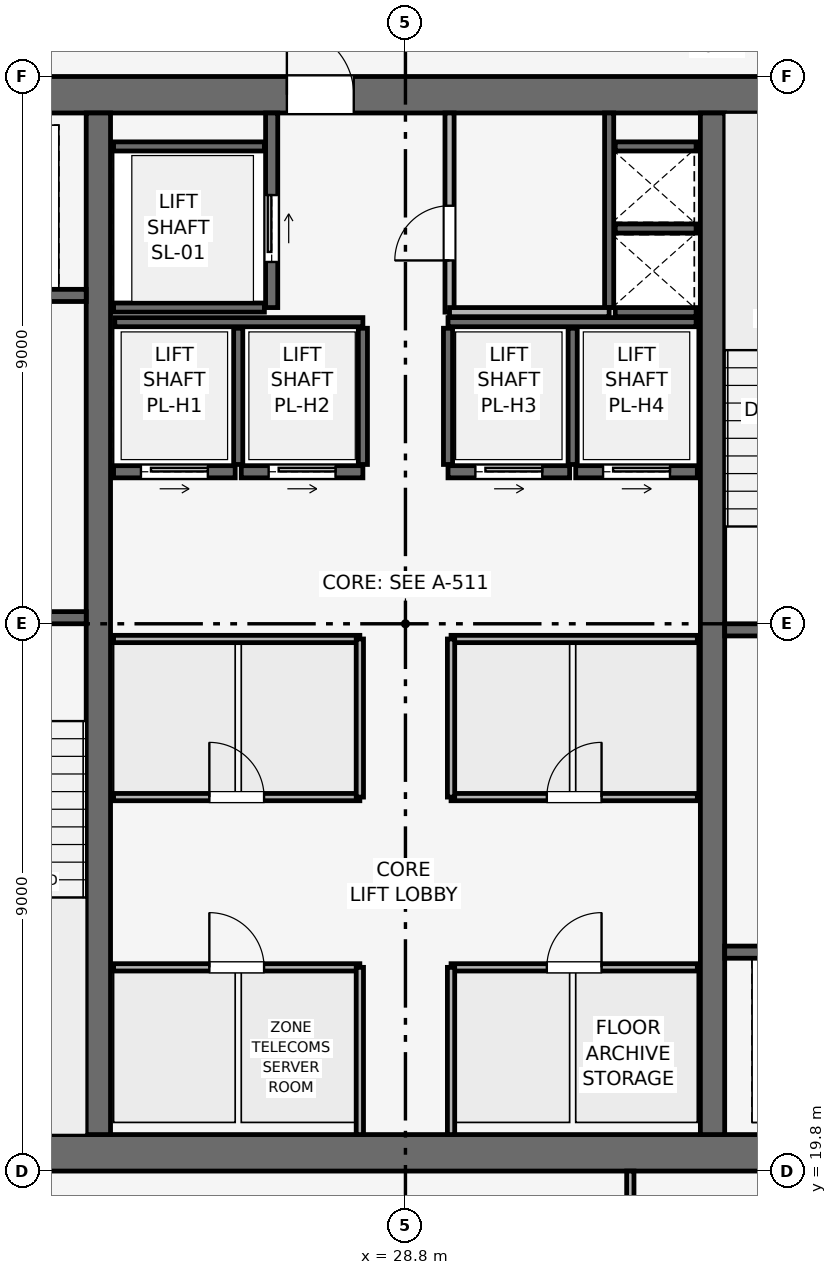
"""IFC4 building model, lengths in metres.
Left out: names, types, materials, properties, quantities, classifications, styles, units other than length and angle.
Written with IfcOpenShell. Run it as: python <this file> out.ifc"""

import sys

from ifc_helpers import new_model, si_unit, direction, frame, frame_2d, origin, place, context, subcontext, project, spatial, rectangle, extrude, element, fill, save


model = new_model("IFC4")
c1 = context("Model", 3, precision=1e-05, world=origin(), true_north=direction((0.0, 1.0)))
c2 = subcontext(c1, "Body", "Model", "MODEL_VIEW")
j1 = project(units=[si_unit("LENGTHUNIT", "METRE"), si_unit("PLANEANGLEUNIT", "RADIAN")], contexts=[c1])
p1 = place(None, origin())
s1 = spatial("IfcSite", under=j1, at=p1, CompositionType="ELEMENT")
p2 = place(p1, origin())
s2 = spatial("IfcBuilding", under=s1, at=p2, CompositionType="ELEMENT")
p3 = place(p2, frame((0.0, 0.0, 310.5)))
s3 = spatial("IfcBuildingStorey", under=s2, at=p3, CompositionType="ELEMENT", Elevation=310.5)
p4 = place(p3, frame((19.8, 20.1, 0.0), z_axis=(0.0, 0.0, 1.0), x_axis=(1.0, 0.0, 0.0)))
e1 = element("IfcWall", 1, at=p4, inside=s3, PredefinedType="SHEAR", context=c2, shape_type="SweptSolid", body=[
    extrude(rectangle(XDim=18.0, YDim=0.6, at=frame_2d((9.0, 0.0))), origin(), (0.0, 0.0, 1.0), 3.75),
])
p5 = place(p3, frame((19.8, 37.5, 0.0), z_axis=(0.0, 0.0, 1.0), x_axis=(1.0, 0.0, 0.0)))
e2 = element("IfcWall", 2, at=p5, inside=s3, PredefinedType="SHEAR", context=c2, shape_type="SweptSolid", body=[
    extrude(rectangle(XDim=18.0, YDim=0.6, at=frame_2d((9.0, 0.0))), origin(), (0.0, 0.0, 1.0), 3.75),
])
p6 = place(p5, frame((7.05, 0.0, 0.0)))
e3 = element("IfcOpeningElement", 3, at=p6, cuts=e2, PredefinedType="OPENING", context=c2, shape_type="SweptSolid", body=[
    extrude(rectangle(XDim=1.1, YDim=2.15, at=frame_2d((0.55, 1.075))), frame((0.0, 0.31, 0.0), z_axis=(0.0, -1.0, 0.0), x_axis=(1.0, 0.0, 0.0)), (0.0, 0.0, 1.0), 0.62),
])
for number, where, z_axis, x_axis in (
    (4, (23.75, 20.4, 0.0), (0.0, 0.0, 1.0), (0.0, 1.0, 0.0)),
    (5, (33.85, 20.4, 0.0), (0.0, 0.0, 1.0), (0.0, 1.0, 0.0)),
):
    element("IfcWall", number, at=place(p3, frame(where, z_axis=z_axis, x_axis=x_axis)), inside=s3, PredefinedType="SHEAR", context=c2, shape_type="SweptSolid", body=[
        extrude(rectangle(XDim=16.8, YDim=0.4, at=frame_2d((8.4, 0.0))), origin(), (0.0, 0.0, 1.0), 3.75),
    ])
p7 = place(p3, frame((20.4, 28.9, 0.0), z_axis=(0.0, 0.0, 1.0), x_axis=(1.0, 0.0, 0.0)))
e6 = element("IfcWall", 6, at=p7, inside=s3, PredefinedType="SHEAR", context=c2, shape_type="SweptSolid", body=[
    extrude(rectangle(XDim=3.15, YDim=0.2, at=frame_2d((1.575, 0.0))), origin(), (0.0, 0.0, 1.0), 3.51),
])
p8 = place(p7, frame((0.8, 0.0, 0.0)))
e7 = element("IfcOpeningElement", 7, at=p8, cuts=e6, PredefinedType="OPENING", context=c2, shape_type="SweptSolid", body=[
    extrude(rectangle(XDim=1.0, YDim=2.1, at=frame_2d((0.5, 1.05))), frame((0.0, 0.11, 0.0), z_axis=(0.0, -1.0, 0.0), x_axis=(1.0, 0.0, 0.0)), (0.0, 0.0, 1.0), 0.22),
])
p9 = place(p3, frame((34.05, 28.7, 0.0), z_axis=(0.0, 0.0, 1.0), x_axis=(1.0, 0.0, 0.0)))
e8 = element("IfcWall", 8, at=p9, inside=s3, PredefinedType="SHEAR", context=c2, shape_type="SweptSolid", body=[
    extrude(rectangle(XDim=3.15, YDim=0.2, at=frame_2d((1.575, 0.0))), origin(), (0.0, 0.0, 1.0), 3.51),
])
p10 = place(p9, frame((0.8, 0.0, 0.0)))
e9 = element("IfcOpeningElement", 9, at=p10, cuts=e8, PredefinedType="OPENING", context=c2, shape_type="SweptSolid", body=[
    extrude(rectangle(XDim=1.0, YDim=2.1, at=frame_2d((0.5, 1.05))), frame((0.0, 0.11, 0.0), z_axis=(0.0, -1.0, 0.0), x_axis=(1.0, 0.0, 0.0)), (0.0, 0.0, 1.0), 0.22),
])
p11 = place(p3, frame((32.15, 34.0, 0.0), z_axis=(0.0, 0.0, 1.0), x_axis=(0.0, 1.0, 0.0)))
e10 = element("IfcWall", 10, at=p11, inside=s3, PredefinedType="SHEAR", context=c2, shape_type="SweptSolid", body=[
    extrude(rectangle(XDim=3.2, YDim=0.15, at=frame_2d((1.6, 0.0))), origin(), (0.0, 0.0, 1.0), 3.51),
])
for number, where, z_axis, x_axis in (
    (11, (32.25, 33.925, 0.0), (0.0, 0.0, 1.0), (1.0, 0.0, 0.0)),
    (12, (32.25, 35.3, 0.0), (0.0, 0.0, 1.0), (1.0, 0.0, 0.0)),
):
    element("IfcWall", number, at=place(p3, frame(where, z_axis=z_axis, x_axis=x_axis)), inside=s3, PredefinedType="SHEAR", context=c2, shape_type="SweptSolid", body=[
        extrude(rectangle(XDim=1.33, YDim=0.15, at=frame_2d((0.665, 0.0))), origin(), (0.0, 0.0, 1.0), 3.51),
    ])
p12 = place(p3, frame((20.5, 34.2, 0.0), z_axis=(0.0, 0.0, 1.0), x_axis=(1.0, 0.0, 0.0)))
e13 = element("IfcWall", 13, at=p12, inside=s3, PredefinedType="SHEAR", context=c2, shape_type="SweptSolid", body=[
    extrude(rectangle(XDim=3.05, YDim=0.2, at=frame_2d((1.525, 0.0))), origin(), (0.0, 0.0, 1.0), 3.51),
])
p13 = place(p12, frame((0.75, 0.0, 0.0)))
e14 = element("IfcOpeningElement", 14, at=p13, cuts=e13, PredefinedType="OPENING", context=c2, shape_type="SweptSolid", body=[
    extrude(rectangle(XDim=1.1, YDim=2.15, at=frame_2d((0.55, 1.075))), frame((0.0, 0.11, 0.0), z_axis=(0.0, -1.0, 0.0), x_axis=(1.0, 0.0, 0.0)), (0.0, 0.0, 1.0), 0.22),
])
p14 = place(p3, frame((34.05, 23.4, 0.0), z_axis=(0.0, 0.0, 1.0), x_axis=(1.0, 0.0, 0.0)))
e15 = element("IfcWall", 15, at=p14, inside=s3, PredefinedType="SHEAR", context=c2, shape_type="SweptSolid", body=[
    extrude(rectangle(XDim=3.05, YDim=0.2, at=frame_2d((1.525, 0.0))), origin(), (0.0, 0.0, 1.0), 3.51),
])
p15 = place(p14, frame((1.2, 0.0, 0.0)))
e16 = element("IfcOpeningElement", 16, at=p15, cuts=e15, PredefinedType="OPENING", context=c2, shape_type="SweptSolid", body=[
    extrude(rectangle(XDim=1.1, YDim=2.15, at=frame_2d((0.55, 1.075))), frame((0.0, 0.11, 0.0), z_axis=(0.0, -1.0, 0.0), x_axis=(1.0, 0.0, 0.0)), (0.0, 0.0, 1.0), 0.22),
])
p16 = place(p3, frame((26.6, 34.0, 0.0), z_axis=(0.0, 0.0, 1.0), x_axis=(0.0, 1.0, 0.0)))
e17 = element("IfcWall", 17, at=p16, inside=s3, PredefinedType="SHEAR", context=c2, shape_type="SweptSolid", body=[
    extrude(rectangle(XDim=3.2, YDim=0.2, at=frame_2d((1.6, 0.0))), origin(), (0.0, 0.0, 1.0), 3.51),
])
p17 = place(p16, frame((0.75, 0.0, 0.0)))
e18 = element("IfcOpeningElement", 18, at=p17, cuts=e17, PredefinedType="OPENING", context=c2, shape_type="SweptSolid", body=[
    extrude(rectangle(XDim=1.1, YDim=2.15, at=frame_2d((0.55, 1.075))), frame((0.0, 0.11, 0.0), z_axis=(0.0, -1.0, 0.0), x_axis=(1.0, 0.0, 0.0)), (0.0, 0.0, 1.0), 0.22),
])
for number, where, z_axis, x_axis in (
    (19, (24.0, 34.0, 0.0), (0.0, 0.0, 1.0), (1.0, 0.0, 0.0)),
    (20, (24.0, 36.65, 0.0), (0.0, 0.0, 1.0), (1.0, 0.0, 0.0)),
):
    element("IfcWall", number, at=place(p3, frame(where, z_axis=z_axis, x_axis=x_axis)), inside=s3, PredefinedType="SHEAR", context=c2, shape_type="SweptSolid", body=[
        extrude(rectangle(XDim=2.48, YDim=0.15, at=frame_2d((1.24, 0.0))), origin(), (0.0, 0.0, 1.0), 3.51),
    ])
p18 = place(p3, frame((24.0, 31.3, 0.0), z_axis=(0.0, 0.0, 1.0), x_axis=(1.0, 0.0, 0.0)))
e21 = element("IfcWall", 21, at=p18, inside=s3, PredefinedType="SHEAR", context=c2, shape_type="SweptSolid", body=[
    extrude(rectangle(XDim=2.0, YDim=0.2, at=frame_2d((1.0, 0.0))), origin(), (0.0, 0.0, 1.0), 3.51),
])
p19 = place(p18, frame((0.45, 0.0, 0.0)))
e22 = element("IfcOpeningElement", 22, at=p19, cuts=e21, PredefinedType="OPENING", context=c2, shape_type="SweptSolid", body=[
    extrude(rectangle(XDim=1.1, YDim=2.15, at=frame_2d((0.55, 1.075))), frame((0.0, 0.11, 0.0), z_axis=(0.0, -1.0, 0.0), x_axis=(1.0, 0.0, 0.0)), (0.0, 0.0, 1.0), 0.22),
])
p20 = place(p3, frame((26.1, 31.3, 0.0), z_axis=(0.0, 0.0, 1.0), x_axis=(1.0, 0.0, 0.0)))
e23 = element("IfcWall", 23, at=p20, inside=s3, PredefinedType="SHEAR", context=c2, shape_type="SweptSolid", body=[
    extrude(rectangle(XDim=2.0, YDim=0.2, at=frame_2d((1.0, 0.0))), origin(), (0.0, 0.0, 1.0), 3.51),
])
p21 = place(p20, frame((0.45, 0.0, 0.0)))
e24 = element("IfcOpeningElement", 24, at=p21, cuts=e23, PredefinedType="OPENING", context=c2, shape_type="SweptSolid", body=[
    extrude(rectangle(XDim=1.1, YDim=2.15, at=frame_2d((0.55, 1.075))), frame((0.0, 0.11, 0.0), z_axis=(0.0, -1.0, 0.0), x_axis=(1.0, 0.0, 0.0)), (0.0, 0.0, 1.0), 0.22),
])
p22 = place(p3, frame((29.5, 31.3, 0.0), z_axis=(0.0, 0.0, 1.0), x_axis=(1.0, 0.0, 0.0)))
e25 = element("IfcWall", 25, at=p22, inside=s3, PredefinedType="SHEAR", context=c2, shape_type="SweptSolid", body=[
    extrude(rectangle(XDim=2.0, YDim=0.2, at=frame_2d((1.0, 0.0))), origin(), (0.0, 0.0, 1.0), 3.51),
])
p23 = place(p22, frame((0.45, 0.0, 0.0)))
e26 = element("IfcOpeningElement", 26, at=p23, cuts=e25, PredefinedType="OPENING", context=c2, shape_type="SweptSolid", body=[
    extrude(rectangle(XDim=1.1, YDim=2.15, at=frame_2d((0.55, 1.075))), frame((0.0, 0.11, 0.0), z_axis=(0.0, -1.0, 0.0), x_axis=(1.0, 0.0, 0.0)), (0.0, 0.0, 1.0), 0.22),
])
p24 = place(p3, frame((31.6, 31.3, 0.0), z_axis=(0.0, 0.0, 1.0), x_axis=(1.0, 0.0, 0.0)))
e27 = element("IfcWall", 27, at=p24, inside=s3, PredefinedType="SHEAR", context=c2, shape_type="SweptSolid", body=[
    extrude(rectangle(XDim=2.0, YDim=0.2, at=frame_2d((1.0, 0.0))), origin(), (0.0, 0.0, 1.0), 3.51),
])
p25 = place(p24, frame((0.45, 0.0, 0.0)))
e28 = element("IfcOpeningElement", 28, at=p25, cuts=e27, PredefinedType="OPENING", context=c2, shape_type="SweptSolid", body=[
    extrude(rectangle(XDim=1.1, YDim=2.15, at=frame_2d((0.55, 1.075))), frame((0.0, 0.11, 0.0), z_axis=(0.0, -1.0, 0.0), x_axis=(1.0, 0.0, 0.0)), (0.0, 0.0, 1.0), 0.22),
])
p26 = place(p3, frame((32.25, 36.65, 0.0), z_axis=(0.0, 0.0, 1.0), x_axis=(1.0, 0.0, 0.0)))
e29 = element("IfcWall", 29, at=p26, inside=s3, PredefinedType="SHEAR", context=c2, shape_type="SweptSolid", body=[
    extrude(rectangle(XDim=1.33, YDim=0.15, at=frame_2d((0.665, 0.0))), origin(), (0.0, 0.0, 1.0), 3.51),
])
for number, where, z_axis, x_axis in (
    (30, (24.02, 33.76, 0.0), (0.0, 0.0, 1.0), (1.0, 0.0, 0.0)),
    (31, (29.5, 33.76, 0.0), (0.0, 0.0, 1.0), (1.0, 0.0, 0.0)),
):
    element("IfcWall", number, at=place(p3, frame(where, z_axis=z_axis, x_axis=x_axis)), inside=s3, PredefinedType="SHEAR", context=c2, shape_type="SweptSolid", body=[
        extrude(rectangle(XDim=4.08, YDim=0.15, at=frame_2d((2.04, 0.0))), origin(), (0.0, 0.0, 1.0), 3.51),
    ])
for number, where, z_axis, x_axis in (
    (32, (26.05, 31.42, 0.0), (0.0, 0.0, 1.0), (0.0, 1.0, 0.0)),
    (33, (28.1, 31.42, 0.0), (0.0, 0.0, 1.0), (0.0, 1.0, 0.0)),
    (34, (29.5, 31.42, 0.0), (0.0, 0.0, 1.0), (0.0, 1.0, 0.0)),
    (35, (31.55, 31.42, 0.0), (0.0, 0.0, 1.0), (0.0, 1.0, 0.0)),
):
    element("IfcWall", number, at=place(p3, frame(where, z_axis=z_axis, x_axis=x_axis)), inside=s3, PredefinedType="SHEAR", context=c2, shape_type="SweptSolid", body=[
        extrude(rectangle(XDim=2.24, YDim=0.15, at=frame_2d((1.12, 0.0))), origin(), (0.0, 0.0, 1.0), 3.51),
    ])
p27 = place(p3, frame((29.525, 33.925, 0.0), z_axis=(0.0, 0.0, 1.0), x_axis=(0.0, 1.0, 0.0)))
e36 = element("IfcWall", 36, at=p27, inside=s3, PredefinedType="PARTITIONING", context=c2, shape_type="SweptSolid", body=[
    extrude(rectangle(XDim=3.275, YDim=0.15, at=frame_2d((1.637, 0.0))), origin(), (0.0, 0.0, 1.0), 3.51),
])
p28 = place(p27, frame((0.85, 0.0, 0.0)))
e37 = element("IfcOpeningElement", 37, at=p28, cuts=e36, PredefinedType="OPENING", context=c2, shape_type="SweptSolid", body=[
    extrude(rectangle(XDim=0.9, YDim=2.1, at=frame_2d((0.45, 1.05))), frame((0.0, 0.085, 0.0), z_axis=(0.0, -1.0, 0.0), x_axis=(1.0, 0.0, 0.0)), (0.0, 0.0, 1.0), 0.17),
])
p29 = place(p3, frame((29.525, 33.925, 0.0), z_axis=(0.0, 0.0, 1.0), x_axis=(1.0, 0.0, 0.0)))
e38 = element("IfcWall", 38, at=p29, inside=s3, PredefinedType="PARTITIONING", context=c2, shape_type="SweptSolid", body=[
    extrude(rectangle(XDim=2.625, YDim=0.15, at=frame_2d((1.312, 0.0))), origin(), (0.0, 0.0, 1.0), 3.51),
])
p30 = place(p3, frame((24.0, 23.15, 0.0), z_axis=(0.0, 0.0, 1.0), x_axis=(1.0, 0.0, 0.0)))
e39 = element("IfcWall", 39, at=p30, inside=s3, PredefinedType="PARTITIONING", context=c2, shape_type="SweptSolid", body=[
    extrude(rectangle(XDim=4.05, YDim=0.12, at=frame_2d((2.025, 0.0))), origin(), (0.0, 0.0, 1.0), 3.51),
])
p31 = place(p30, frame((1.575, 0.0, 0.0)))
e40 = element("IfcOpeningElement", 40, at=p31, cuts=e39, PredefinedType="OPENING", context=c2, shape_type="SweptSolid", body=[
    extrude(rectangle(XDim=0.9, YDim=2.1, at=frame_2d((0.45, 1.05))), frame((0.0, 0.07, 0.0), z_axis=(0.0, -1.0, 0.0), x_axis=(1.0, 0.0, 0.0)), (0.0, 0.0, 1.0), 0.14),
])
p32 = place(p3, frame((28.05, 20.4, 0.0), z_axis=(0.0, 0.0, 1.0), x_axis=(0.0, 1.0, 0.0)))
e41 = element("IfcWall", 41, at=p32, inside=s3, PredefinedType="PARTITIONING", context=c2, shape_type="SweptSolid", body=[
    extrude(rectangle(XDim=2.75, YDim=0.12, at=frame_2d((1.375, 0.0))), origin(), (0.0, 0.0, 1.0), 3.51),
])
p33 = place(p3, frame((29.55, 23.15, 0.0), z_axis=(0.0, 0.0, 1.0), x_axis=(1.0, 0.0, 0.0)))
e42 = element("IfcWall", 42, at=p33, inside=s3, PredefinedType="PARTITIONING", context=c2, shape_type="SweptSolid", body=[
    extrude(rectangle(XDim=4.05, YDim=0.12, at=frame_2d((2.025, 0.0))), origin(), (0.0, 0.0, 1.0), 3.51),
])
p34 = place(p33, frame((1.575, 0.0, 0.0)))
e43 = element("IfcOpeningElement", 43, at=p34, cuts=e42, PredefinedType="OPENING", context=c2, shape_type="SweptSolid", body=[
    extrude(rectangle(XDim=0.9, YDim=2.1, at=frame_2d((0.45, 1.05))), frame((0.0, 0.07, 0.0), z_axis=(0.0, -1.0, 0.0), x_axis=(1.0, 0.0, 0.0)), (0.0, 0.0, 1.0), 0.14),
])
p35 = place(p3, frame((29.55, 20.4, 0.0), z_axis=(0.0, 0.0, 1.0), x_axis=(0.0, 1.0, 0.0)))
e44 = element("IfcWall", 44, at=p35, inside=s3, PredefinedType="PARTITIONING", context=c2, shape_type="SweptSolid", body=[
    extrude(rectangle(XDim=2.75, YDim=0.12, at=frame_2d((1.375, 0.0))), origin(), (0.0, 0.0, 1.0), 3.51),
])
p36 = place(p3, frame((24.0, 25.95, 0.0), z_axis=(0.0, 0.0, 1.0), x_axis=(1.0, 0.0, 0.0)))
e45 = element("IfcWall", 45, at=p36, inside=s3, PredefinedType="PARTITIONING", context=c2, shape_type="SweptSolid", body=[
    extrude(rectangle(XDim=4.05, YDim=0.12, at=frame_2d((2.025, 0.0))), origin(), (0.0, 0.0, 1.0), 3.51),
])
p37 = place(p36, frame((1.575, 0.0, 0.0)))
e46 = element("IfcOpeningElement", 46, at=p37, cuts=e45, PredefinedType="OPENING", context=c2, shape_type="SweptSolid", body=[
    extrude(rectangle(XDim=0.9, YDim=2.1, at=frame_2d((0.45, 1.05))), frame((0.0, 0.07, 0.0), z_axis=(0.0, -1.0, 0.0), x_axis=(1.0, 0.0, 0.0)), (0.0, 0.0, 1.0), 0.14),
])
p38 = place(p3, frame((24.0, 28.55, 0.0), z_axis=(0.0, 0.0, 1.0), x_axis=(1.0, 0.0, 0.0)))
e47 = element("IfcWall", 47, at=p38, inside=s3, PredefinedType="PARTITIONING", context=c2, shape_type="SweptSolid", body=[
    extrude(rectangle(XDim=4.05, YDim=0.12, at=frame_2d((2.025, 0.0))), origin(), (0.0, 0.0, 1.0), 3.51),
])
p39 = place(p3, frame((28.05, 25.95, 0.0), z_axis=(0.0, 0.0, 1.0), x_axis=(0.0, 1.0, 0.0)))
e48 = element("IfcWall", 48, at=p39, inside=s3, PredefinedType="PARTITIONING", context=c2, shape_type="SweptSolid", body=[
    extrude(rectangle(XDim=2.6, YDim=0.12, at=frame_2d((1.3, 0.0))), origin(), (0.0, 0.0, 1.0), 3.51),
])
p40 = place(p3, frame((29.55, 25.95, 0.0), z_axis=(0.0, 0.0, 1.0), x_axis=(1.0, 0.0, 0.0)))
e49 = element("IfcWall", 49, at=p40, inside=s3, PredefinedType="PARTITIONING", context=c2, shape_type="SweptSolid", body=[
    extrude(rectangle(XDim=4.05, YDim=0.12, at=frame_2d((2.025, 0.0))), origin(), (0.0, 0.0, 1.0), 3.51),
])
p41 = place(p40, frame((1.575, 0.0, 0.0)))
e50 = element("IfcOpeningElement", 50, at=p41, cuts=e49, PredefinedType="OPENING", context=c2, shape_type="SweptSolid", body=[
    extrude(rectangle(XDim=0.9, YDim=2.1, at=frame_2d((0.45, 1.05))), frame((0.0, 0.07, 0.0), z_axis=(0.0, -1.0, 0.0), x_axis=(1.0, 0.0, 0.0)), (0.0, 0.0, 1.0), 0.14),
])
p42 = place(p3, frame((29.55, 28.55, 0.0), z_axis=(0.0, 0.0, 1.0), x_axis=(1.0, 0.0, 0.0)))
e51 = element("IfcWall", 51, at=p42, inside=s3, PredefinedType="PARTITIONING", context=c2, shape_type="SweptSolid", body=[
    extrude(rectangle(XDim=4.05, YDim=0.12, at=frame_2d((2.025, 0.0))), origin(), (0.0, 0.0, 1.0), 3.51),
])
p43 = place(p3, frame((29.55, 25.95, 0.0), z_axis=(0.0, 0.0, 1.0), x_axis=(0.0, 1.0, 0.0)))
e52 = element("IfcWall", 52, at=p43, inside=s3, PredefinedType="PARTITIONING", context=c2, shape_type="SweptSolid", body=[
    extrude(rectangle(XDim=2.6, YDim=0.12, at=frame_2d((1.3, 0.0))), origin(), (0.0, 0.0, 1.0), 3.51),
])
p44 = place(p3, frame((32.498, 6.13, 0.0), z_axis=(0.0, 0.0, 1.0), x_axis=(0.0, 1.0, 0.0)))
e53 = element("IfcWall", 53, at=p44, inside=s3, PredefinedType="PARTITIONING", context=c2, shape_type="SweptSolid", body=[
    extrude(rectangle(XDim=13.67, YDim=0.12, at=frame_2d((6.835, 0.0))), origin(), (0.0, 0.0, 1.0), 3.135),
])
p45 = place(p44, frame((11.27, 0.0, 0.0)))
e54 = element("IfcOpeningElement", 54, at=p45, cuts=e53, PredefinedType="OPENING", context=c2, shape_type="SweptSolid", body=[
    extrude(rectangle(XDim=0.9, YDim=2.1, at=frame_2d((0.45, 1.05))), frame((0.0, 0.07, 0.0), z_axis=(0.0, -1.0, 0.0), x_axis=(1.0, 0.0, 0.0)), (0.0, 0.0, 1.0), 0.14),
])
p46 = place(p17, origin())
e55 = element("IfcDoor", 55, at=p46, inside=s3, OperationType="SLIDING_TO_RIGHT", PredefinedType="DOOR", context=c2, shape_type="SweptSolid", body=[
    extrude(rectangle(XDim=1.1, YDim=2.15, at=frame_2d((0.55, 1.075))), frame((0.0, 0.025, 0.0), z_axis=(0.0, -1.0, 0.0), x_axis=(1.0, 0.0, 0.0)), (0.0, 0.0, 1.0), 0.05),
])
fill(e18, e55)
p47 = place(p19, origin())
e56 = element("IfcDoor", 56, at=p47, inside=s3, OperationType="SLIDING_TO_RIGHT", PredefinedType="DOOR", context=c2, shape_type="SweptSolid", body=[
    extrude(rectangle(XDim=1.1, YDim=2.15, at=frame_2d((0.55, 1.075))), frame((0.0, 0.025, 0.0), z_axis=(0.0, -1.0, 0.0), x_axis=(1.0, 0.0, 0.0)), (0.0, 0.0, 1.0), 0.05),
])
fill(e22, e56)
p48 = place(p21, origin())
e57 = element("IfcDoor", 57, at=p48, inside=s3, OperationType="SLIDING_TO_RIGHT", PredefinedType="DOOR", context=c2, shape_type="SweptSolid", body=[
    extrude(rectangle(XDim=1.1, YDim=2.15, at=frame_2d((0.55, 1.075))), frame((0.0, 0.025, 0.0), z_axis=(0.0, -1.0, 0.0), x_axis=(1.0, 0.0, 0.0)), (0.0, 0.0, 1.0), 0.05),
])
fill(e24, e57)
p49 = place(p23, origin())
e58 = element("IfcDoor", 58, at=p49, inside=s3, OperationType="SLIDING_TO_RIGHT", PredefinedType="DOOR", context=c2, shape_type="SweptSolid", body=[
    extrude(rectangle(XDim=1.1, YDim=2.15, at=frame_2d((0.55, 1.075))), frame((0.0, 0.025, 0.0), z_axis=(0.0, -1.0, 0.0), x_axis=(1.0, 0.0, 0.0)), (0.0, 0.0, 1.0), 0.05),
])
fill(e26, e58)
p50 = place(p25, origin())
e59 = element("IfcDoor", 59, at=p50, inside=s3, OperationType="SLIDING_TO_RIGHT", PredefinedType="DOOR", context=c2, shape_type="SweptSolid", body=[
    extrude(rectangle(XDim=1.1, YDim=2.15, at=frame_2d((0.55, 1.075))), frame((0.0, 0.025, 0.0), z_axis=(0.0, -1.0, 0.0), x_axis=(1.0, 0.0, 0.0)), (0.0, 0.0, 1.0), 0.05),
])
fill(e28, e59)
p51 = place(p28, origin())
e60 = element("IfcDoor", 60, at=p51, inside=s3, OperationType="SINGLE_SWING_LEFT", PredefinedType="DOOR", context=c2, shape_type="SweptSolid", body=[
    extrude(rectangle(XDim=0.9, YDim=2.1, at=frame_2d((0.45, 1.05))), frame((0.0, 0.025, 0.0), z_axis=(0.0, -1.0, 0.0), x_axis=(1.0, 0.0, 0.0)), (0.0, 0.0, 1.0), 0.05),
])
fill(e37, e60)
p52 = place(p31, origin())
e61 = element("IfcDoor", 61, at=p52, inside=s3, OperationType="SINGLE_SWING_LEFT", PredefinedType="DOOR", context=c2, shape_type="SweptSolid", body=[
    extrude(rectangle(XDim=0.9, YDim=2.1, at=frame_2d((0.45, 1.05))), frame((0.0, 0.025, 0.0), z_axis=(0.0, -1.0, 0.0), x_axis=(1.0, 0.0, 0.0)), (0.0, 0.0, 1.0), 0.05),
])
fill(e40, e61)
p53 = place(p34, origin())
e62 = element("IfcDoor", 62, at=p53, inside=s3, OperationType="SINGLE_SWING_RIGHT", PredefinedType="DOOR", context=c2, shape_type="SweptSolid", body=[
    extrude(rectangle(XDim=0.9, YDim=2.1, at=frame_2d((0.45, 1.05))), frame((0.0, 0.025, 0.0), z_axis=(0.0, -1.0, 0.0), x_axis=(1.0, 0.0, 0.0)), (0.0, 0.0, 1.0), 0.05),
])
fill(e43, e62)
p54 = place(p37, origin())
e63 = element("IfcDoor", 63, at=p54, inside=s3, OperationType="SINGLE_SWING_LEFT", PredefinedType="DOOR", context=c2, shape_type="SweptSolid", body=[
    extrude(rectangle(XDim=0.9, YDim=2.1, at=frame_2d((0.45, 1.05))), frame((0.0, 0.025, 0.0), z_axis=(0.0, -1.0, 0.0), x_axis=(1.0, 0.0, 0.0)), (0.0, 0.0, 1.0), 0.05),
])
fill(e46, e63)
p55 = place(p41, origin())
e64 = element("IfcDoor", 64, at=p55, inside=s3, OperationType="SINGLE_SWING_RIGHT", PredefinedType="DOOR", context=c2, shape_type="SweptSolid", body=[
    extrude(rectangle(XDim=0.9, YDim=2.1, at=frame_2d((0.45, 1.05))), frame((0.0, 0.025, 0.0), z_axis=(0.0, -1.0, 0.0), x_axis=(1.0, 0.0, 0.0)), (0.0, 0.0, 1.0), 0.05),
])
fill(e50, e64)
p56 = place(p6, origin())
e65 = element("IfcDoor", 65, at=p56, inside=s3, OperationType="SINGLE_SWING_LEFT", PredefinedType="DOOR", context=c2, shape_type="SweptSolid", body=[
    extrude(rectangle(XDim=1.1, YDim=2.15, at=frame_2d((0.55, 1.075))), frame((0.0, 0.025, 0.0), z_axis=(0.0, -1.0, 0.0), x_axis=(1.0, 0.0, 0.0)), (0.0, 0.0, 1.0), 0.05),
])
fill(e3, e65)
save(model, sys.argv[1])
